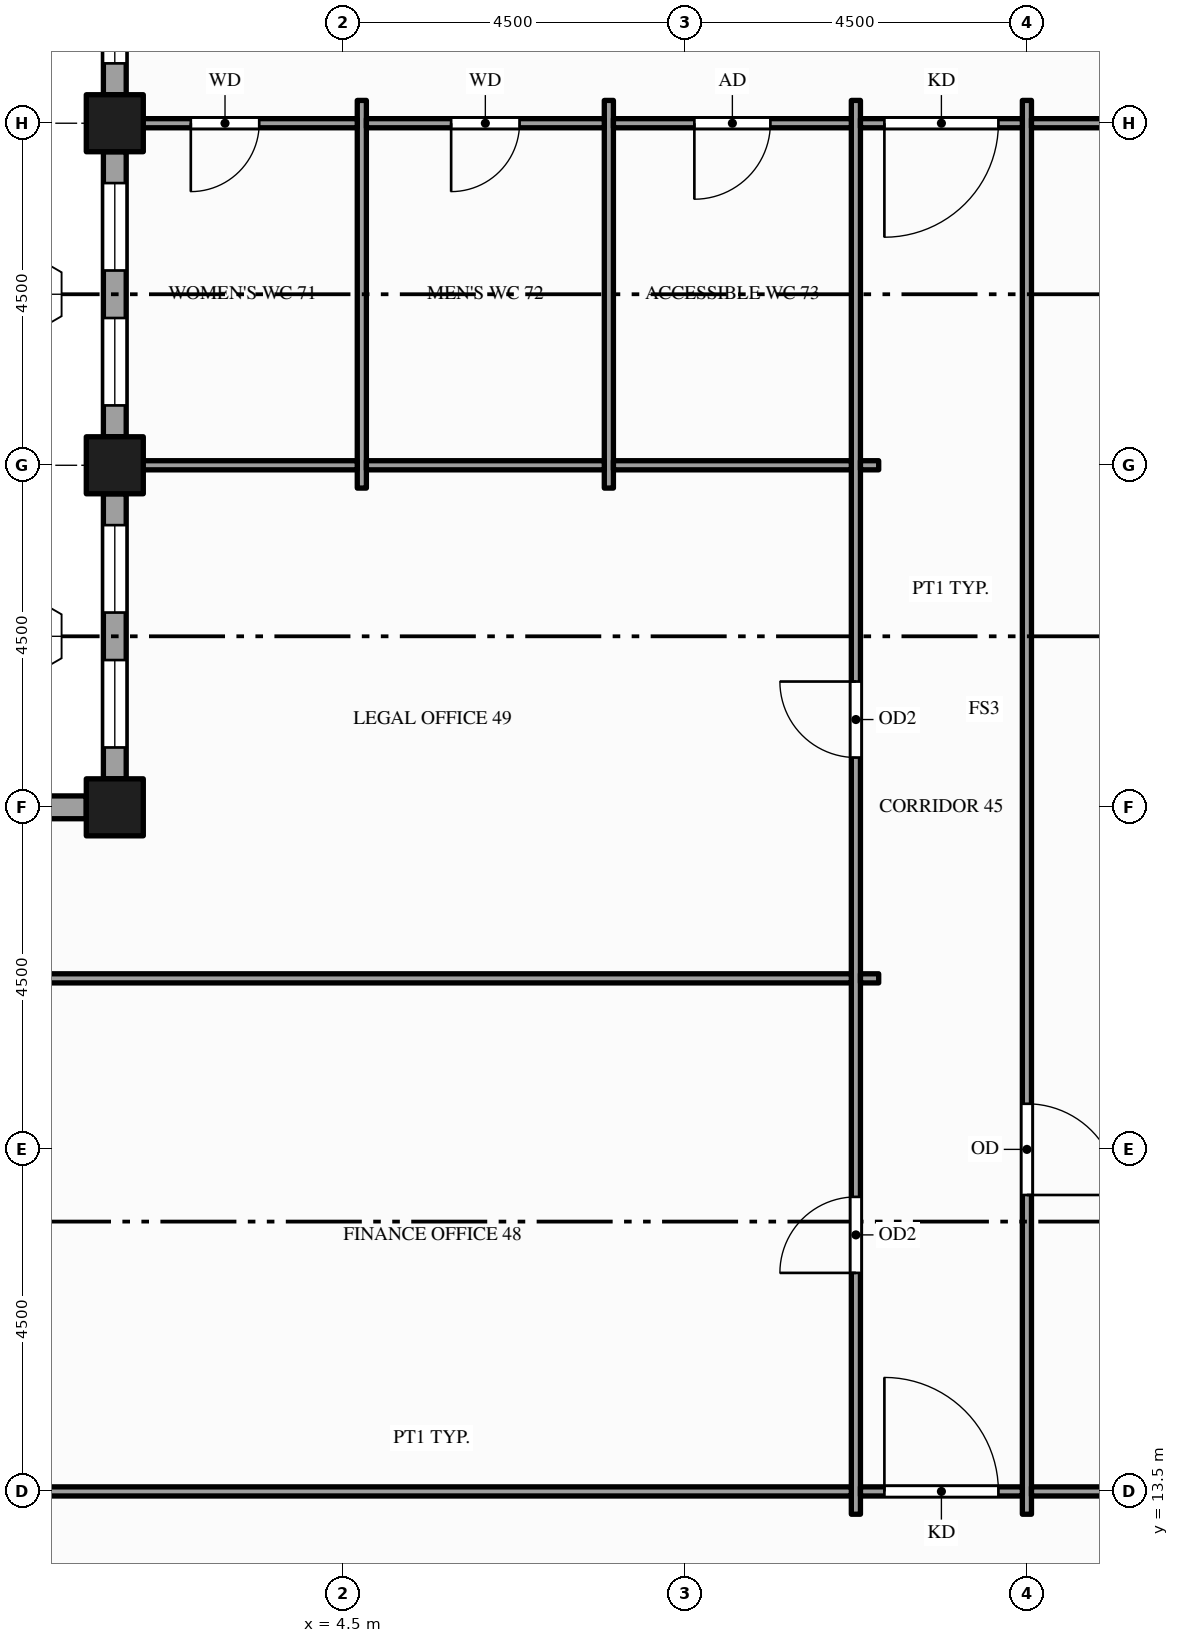
"""IFC4 building model, lengths in metres.
Left out: names, types, materials, properties, quantities, classifications, styles, units other than length and angle.
Written with IfcOpenShell. Run it as: python <this file> out.ifc"""

import sys

from ifc_helpers import new_model, si_unit, direction, frame, frame_2d, origin, origin_2d, place, context, subcontext, project, spatial, rectangle, hollow_rectangle, extrude, element, fill, save


model = new_model("IFC4")
c1 = context("Model", 3, precision=1e-05, world=origin(), true_north=direction((0.0, 1.0)))
c2 = subcontext(c1, "Body", "Model", "MODEL_VIEW")
j1 = project(units=[si_unit("LENGTHUNIT", "METRE"), si_unit("PLANEANGLEUNIT", "RADIAN")], contexts=[c1])
p1 = place(None, origin())
s1 = spatial("IfcSite", under=j1, at=p1, CompositionType="ELEMENT")
p2 = place(p1, origin())
s2 = spatial("IfcBuilding", under=s1, at=p2, CompositionType="ELEMENT")
p3 = place(p2, frame((0.0, 0.0, 207.0)))
s3 = spatial("IfcBuildingStorey", under=s2, at=p3, CompositionType="ELEMENT", Elevation=207.0)
for number, where, z_axis, x_axis in (
    (1, (1.5, 22.5, -0.15), (0.0, 0.0, 1.0), (1.0, 0.0, 0.0)),
    (2, (1.5, 27.0, -0.15), (0.0, 0.0, 1.0), (1.0, 0.0, 0.0)),
    (3, (1.5, 31.5, -0.15), (0.0, 0.0, 1.0), (1.0, 0.0, 0.0)),
):
    element("IfcColumn", number, at=place(p3, frame(where, z_axis=z_axis, x_axis=x_axis)), inside=s3, PredefinedType="COLUMN", context=c2, shape_type="SweptSolid", body=[
        extrude(hollow_rectangle(XDim=0.75, YDim=0.75, WallThickness=0.036, at=origin_2d()), origin(), (0.0, 0.0, 1.0), 4.0),
    ])
p4 = place(p3, frame((1.5, 36.0, 0.0), z_axis=(0.0, 0.0, 1.0), x_axis=(0.0, -1.0, 0.0)))
e4 = element("IfcWall", 4, at=p4, inside=s3, PredefinedType="STANDARD", context=c2, shape_type="SweptSolid", body=[
    extrude(rectangle(XDim=4.125, YDim=0.3, at=frame_2d((2.062, 0.0))), origin(), (0.0, 0.0, 1.0), 3.157),
])
p5 = place(p4, frame((0.4, 0.0, 0.9)))
e5 = element("IfcOpeningElement", 5, at=p5, cuts=e4, PredefinedType="OPENING", context=c2, shape_type="SweptSolid", body=[
    extrude(rectangle(XDim=1.55, YDim=2.0, at=frame_2d((0.775, 1.0))), frame((0.0, 0.16, 0.0), z_axis=(0.0, -1.0, 0.0), x_axis=(1.0, 0.0, 0.0)), (0.0, 0.0, 1.0), 0.32),
])
p6 = place(p4, frame((2.562, 0.0, 0.9)))
e6 = element("IfcOpeningElement", 6, at=p6, cuts=e4, PredefinedType="OPENING", context=c2, shape_type="SweptSolid", body=[
    extrude(rectangle(XDim=1.15, YDim=2.0, at=frame_2d((0.575, 1.0))), frame((0.0, 0.16, 0.0), z_axis=(0.0, -1.0, 0.0), x_axis=(1.0, 0.0, 0.0)), (0.0, 0.0, 1.0), 0.32),
])
p7 = place(p3, frame((1.5, 31.125, 0.0), z_axis=(0.0, 0.0, 1.0), x_axis=(0.0, -1.0, 0.0)))
e7 = element("IfcWall", 7, at=p7, inside=s3, PredefinedType="STANDARD", context=c2, shape_type="SweptSolid", body=[
    extrude(rectangle(XDim=3.75, YDim=0.3, at=frame_2d((1.875, 0.0))), origin(), (0.0, 0.0, 1.0), 3.157),
])
p8 = place(p7, frame((0.413, 0.0, 0.9)))
e8 = element("IfcOpeningElement", 8, at=p8, cuts=e7, PredefinedType="OPENING", context=c2, shape_type="SweptSolid", body=[
    extrude(rectangle(XDim=1.15, YDim=2.0, at=frame_2d((0.575, 1.0))), frame((0.0, 0.16, 0.0), z_axis=(0.0, -1.0, 0.0), x_axis=(1.0, 0.0, 0.0)), (0.0, 0.0, 1.0), 0.32),
])
p9 = place(p7, frame((2.188, 0.0, 0.9)))
e9 = element("IfcOpeningElement", 9, at=p9, cuts=e7, PredefinedType="OPENING", context=c2, shape_type="SweptSolid", body=[
    extrude(rectangle(XDim=1.15, YDim=2.0, at=frame_2d((0.575, 1.0))), frame((0.0, 0.16, 0.0), z_axis=(0.0, -1.0, 0.0), x_axis=(1.0, 0.0, 0.0)), (0.0, 0.0, 1.0), 0.32),
])
p10 = place(p3, frame((1.5, 26.625, 0.0), z_axis=(0.0, 0.0, 1.0), x_axis=(0.0, -1.0, 0.0)))
e10 = element("IfcWall", 10, at=p10, inside=s3, PredefinedType="STANDARD", context=c2, shape_type="SweptSolid", body=[
    extrude(rectangle(XDim=3.75, YDim=0.3, at=frame_2d((1.875, 0.0))), origin(), (0.0, 0.0, 1.0), 3.157),
])
p11 = place(p10, frame((0.413, 0.0, 0.9)))
e11 = element("IfcOpeningElement", 11, at=p11, cuts=e10, PredefinedType="OPENING", context=c2, shape_type="SweptSolid", body=[
    extrude(rectangle(XDim=1.15, YDim=2.0, at=frame_2d((0.575, 1.0))), frame((0.0, 0.16, 0.0), z_axis=(0.0, -1.0, 0.0), x_axis=(1.0, 0.0, 0.0)), (0.0, 0.0, 1.0), 0.32),
])
p12 = place(p10, frame((2.188, 0.0, 0.9)))
e12 = element("IfcOpeningElement", 12, at=p12, cuts=e10, PredefinedType="OPENING", context=c2, shape_type="SweptSolid", body=[
    extrude(rectangle(XDim=1.15, YDim=2.0, at=frame_2d((0.575, 1.0))), frame((0.0, 0.16, 0.0), z_axis=(0.0, -1.0, 0.0), x_axis=(1.0, 0.0, 0.0)), (0.0, 0.0, 1.0), 0.32),
])
p13 = place(p3, frame((1.125, 22.5, 0.0), z_axis=(0.0, 0.0, 1.0), x_axis=(-1.0, 0.0, 0.0)))
e13 = element("IfcWall", 13, at=p13, inside=s3, PredefinedType="STANDARD", context=c2, shape_type="SweptSolid", body=[
    extrude(rectangle(XDim=0.75, YDim=0.3, at=frame_2d((0.375, 0.0))), origin(), (0.0, 0.0, 1.0), 3.157),
])
for number, where, z_axis, x_axis in (
    (14, (4.75, 26.7, 0.0), (0.0, 0.0, 1.0), (0.0, 1.0, 0.0)),
    (15, (8.0, 26.7, 0.0), (0.0, 0.0, 1.0), (0.0, 1.0, 0.0)),
):
    element("IfcWall", number, at=place(p3, frame(where, z_axis=z_axis, x_axis=x_axis)), inside=s3, PredefinedType="PARTITIONING", context=c2, shape_type="SweptSolid", body=[
        extrude(rectangle(XDim=5.1, YDim=0.12, at=frame_2d((2.55, 0.0))), origin(), (0.0, 0.0, 1.0), 3.85),
    ])
p14 = place(p3, frame((11.25, 13.2, 0.0), z_axis=(0.0, 0.0, 1.0), x_axis=(0.0, 1.0, 0.0)))
e16 = element("IfcWall", 16, at=p14, inside=s3, PredefinedType="PARTITIONING", context=c2, shape_type="SweptSolid", body=[
    extrude(rectangle(XDim=18.6, YDim=0.12, at=frame_2d((9.3, 0.0))), origin(), (0.0, 0.0, 1.0), 2.6),
])
p15 = place(p14, frame((3.175, 0.0, 0.0)))
e17 = element("IfcOpeningElement", 17, at=p15, cuts=e16, PredefinedType="OPENING", context=c2, shape_type="SweptSolid", body=[
    extrude(rectangle(XDim=1.0, YDim=2.1, at=frame_2d((0.5, 1.05))), frame((0.0, 0.07, 0.0), z_axis=(0.0, -1.0, 0.0), x_axis=(1.0, 0.0, 0.0)), (0.0, 0.0, 1.0), 0.14),
])
p16 = place(p14, frame((9.955, 0.0, 0.0)))
e18 = element("IfcOpeningElement", 18, at=p16, cuts=e16, PredefinedType="OPENING", context=c2, shape_type="SweptSolid", body=[
    extrude(rectangle(XDim=1.0, YDim=2.1, at=frame_2d((0.5, 1.05))), frame((0.0, 0.07, 0.0), z_axis=(0.0, -1.0, 0.0), x_axis=(1.0, 0.0, 0.0)), (0.0, 0.0, 1.0), 0.14),
])
p17 = place(p3, frame((13.5, 13.2, 0.0), z_axis=(0.0, 0.0, 1.0), x_axis=(0.0, 1.0, 0.0)))
e19 = element("IfcWall", 19, at=p17, inside=s3, PredefinedType="PARTITIONING", context=c2, shape_type="SweptSolid", body=[
    extrude(rectangle(XDim=18.6, YDim=0.12, at=frame_2d((9.3, 0.0))), origin(), (0.0, 0.0, 1.0), 2.6),
])
p18 = place(p17, frame((4.2, 0.0, 0.0)))
e20 = element("IfcOpeningElement", 20, at=p18, cuts=e19, PredefinedType="OPENING", context=c2, shape_type="SweptSolid", body=[
    extrude(rectangle(XDim=1.2, YDim=2.1, at=frame_2d((0.6, 1.05))), frame((0.0, 0.07, 0.0), z_axis=(0.0, -1.0, 0.0), x_axis=(1.0, 0.0, 0.0)), (0.0, 0.0, 1.0), 0.14),
])
p19 = place(p3, frame((0.15, 13.5, 0.0), z_axis=(0.0, 0.0, 1.0), x_axis=(1.0, 0.0, 0.0)))
e21 = element("IfcWall", 21, at=p19, inside=s3, PredefinedType="PARTITIONING", context=c2, shape_type="SweptSolid", body=[
    extrude(rectangle(XDim=11.04, YDim=0.12, at=frame_2d((5.52, 0.0))), origin(), (0.0, 0.0, 1.0), 2.87),
])
p20 = place(p3, frame((11.31, 13.5, 0.0), z_axis=(0.0, 0.0, 1.0), x_axis=(1.0, 0.0, 0.0)))
e22 = element("IfcWall", 22, at=p20, inside=s3, PredefinedType="PARTITIONING", context=c2, shape_type="SweptSolid", body=[
    extrude(rectangle(XDim=2.13, YDim=0.12, at=frame_2d((1.065, 0.0))), origin(), (0.0, 0.0, 1.0), 2.87),
])
p21 = place(p20, frame((0.315, 0.0, 0.0)))
e23 = element("IfcOpeningElement", 23, at=p21, cuts=e22, PredefinedType="OPENING", context=c2, shape_type="SweptSolid", body=[
    extrude(rectangle(XDim=1.5, YDim=2.1, at=frame_2d((0.75, 1.05))), frame((0.0, 0.07, 0.0), z_axis=(0.0, -1.0, 0.0), x_axis=(1.0, 0.0, 0.0)), (0.0, 0.0, 1.0), 0.14),
])
p22 = place(p3, frame((13.56, 13.5, 0.0), z_axis=(0.0, 0.0, 1.0), x_axis=(1.0, 0.0, 0.0)))
e24 = element("IfcWall", 24, at=p22, inside=s3, PredefinedType="PARTITIONING", context=c2, shape_type="SweptSolid", body=[
    extrude(rectangle(XDim=13.38, YDim=0.12, at=frame_2d((6.69, 0.0))), origin(), (0.0, 0.0, 1.0), 2.76),
])
p23 = place(p22, frame((3.54, 0.0, 0.0)))
e25 = element("IfcOpeningElement", 25, at=p23, cuts=e24, PredefinedType="OPENING", context=c2, shape_type="SweptSolid", body=[
    extrude(rectangle(XDim=1.8, YDim=2.1, at=frame_2d((0.9, 1.05))), frame((0.0, 0.07, 0.0), z_axis=(0.0, -1.0, 0.0), x_axis=(1.0, 0.0, 0.0)), (0.0, 0.0, 1.0), 0.14),
])
p24 = place(p3, frame((0.15, 20.25, 0.0), z_axis=(0.0, 0.0, 1.0), x_axis=(1.0, 0.0, 0.0)))
e26 = element("IfcWall", 26, at=p24, inside=s3, PredefinedType="PARTITIONING", context=c2, shape_type="SweptSolid", body=[
    extrude(rectangle(XDim=11.04, YDim=0.12, at=frame_2d((5.52, 0.0))), origin(), (0.0, 0.0, 1.0), 2.87),
])
p25 = place(p3, frame((11.31, 20.25, 0.0), z_axis=(0.0, 0.0, 1.0), x_axis=(1.0, 0.0, 0.0)))
e27 = element("IfcWall", 27, at=p25, inside=s3, PredefinedType="PARTITIONING", context=c2, shape_type="SweptSolid", body=[
    extrude(rectangle(XDim=0.24, YDim=0.12, at=frame_2d((0.12, 0.0))), origin(), (0.0, 0.0, 1.0), 2.87),
])
p26 = place(p3, frame((1.65, 27.0, 0.0), z_axis=(0.0, 0.0, 1.0), x_axis=(1.0, 0.0, 0.0)))
e28 = element("IfcWall", 28, at=p26, inside=s3, PredefinedType="PARTITIONING", context=c2, shape_type="SweptSolid", body=[
    extrude(rectangle(XDim=3.04, YDim=0.12, at=frame_2d((1.52, 0.0))), origin(), (0.0, 0.0, 1.0), 2.87),
])
for number, where, z_axis, x_axis in (
    (29, (4.81, 27.0, 0.0), (0.0, 0.0, 1.0), (1.0, 0.0, 0.0)),
    (30, (8.06, 27.0, 0.0), (0.0, 0.0, 1.0), (1.0, 0.0, 0.0)),
):
    element("IfcWall", number, at=place(p3, frame(where, z_axis=z_axis, x_axis=x_axis)), inside=s3, PredefinedType="PARTITIONING", context=c2, shape_type="SweptSolid", body=[
        extrude(rectangle(XDim=3.13, YDim=0.12, at=frame_2d((1.565, 0.0))), origin(), (0.0, 0.0, 1.0), 2.87),
    ])
p27 = place(p3, frame((11.31, 27.0, 0.0), z_axis=(0.0, 0.0, 1.0), x_axis=(1.0, 0.0, 0.0)))
e31 = element("IfcWall", 31, at=p27, inside=s3, PredefinedType="PARTITIONING", context=c2, shape_type="SweptSolid", body=[
    extrude(rectangle(XDim=0.24, YDim=0.12, at=frame_2d((0.12, 0.0))), origin(), (0.0, 0.0, 1.0), 2.87),
])
p28 = place(p3, frame((1.65, 31.5, 0.0), z_axis=(0.0, 0.0, 1.0), x_axis=(1.0, 0.0, 0.0)))
e32 = element("IfcWall", 32, at=p28, inside=s3, PredefinedType="PARTITIONING", context=c2, shape_type="SweptSolid", body=[
    extrude(rectangle(XDim=3.04, YDim=0.12, at=frame_2d((1.52, 0.0))), origin(), (0.0, 0.0, 1.0), 2.87),
])
p29 = place(p28, frame((0.85, 0.0, 0.0)))
e33 = element("IfcOpeningElement", 33, at=p29, cuts=e32, PredefinedType="OPENING", context=c2, shape_type="SweptSolid", body=[
    extrude(rectangle(XDim=0.9, YDim=2.1, at=frame_2d((0.45, 1.05))), frame((0.0, 0.07, 0.0), z_axis=(0.0, -1.0, 0.0), x_axis=(1.0, 0.0, 0.0)), (0.0, 0.0, 1.0), 0.14),
])
p30 = place(p3, frame((4.81, 31.5, 0.0), z_axis=(0.0, 0.0, 1.0), x_axis=(1.0, 0.0, 0.0)))
e34 = element("IfcWall", 34, at=p30, inside=s3, PredefinedType="PARTITIONING", context=c2, shape_type="SweptSolid", body=[
    extrude(rectangle(XDim=3.13, YDim=0.12, at=frame_2d((1.565, 0.0))), origin(), (0.0, 0.0, 1.0), 2.87),
])
p31 = place(p30, frame((1.115, 0.0, 0.0)))
e35 = element("IfcOpeningElement", 35, at=p31, cuts=e34, PredefinedType="OPENING", context=c2, shape_type="SweptSolid", body=[
    extrude(rectangle(XDim=0.9, YDim=2.1, at=frame_2d((0.45, 1.05))), frame((0.0, 0.07, 0.0), z_axis=(0.0, -1.0, 0.0), x_axis=(1.0, 0.0, 0.0)), (0.0, 0.0, 1.0), 0.14),
])
p32 = place(p3, frame((8.06, 31.5, 0.0), z_axis=(0.0, 0.0, 1.0), x_axis=(1.0, 0.0, 0.0)))
e36 = element("IfcWall", 36, at=p32, inside=s3, PredefinedType="PARTITIONING", context=c2, shape_type="SweptSolid", body=[
    extrude(rectangle(XDim=3.13, YDim=0.12, at=frame_2d((1.565, 0.0))), origin(), (0.0, 0.0, 1.0), 2.87),
])
p33 = place(p32, frame((1.065, 0.0, 0.0)))
e37 = element("IfcOpeningElement", 37, at=p33, cuts=e36, PredefinedType="OPENING", context=c2, shape_type="SweptSolid", body=[
    extrude(rectangle(XDim=1.0, YDim=2.1, at=frame_2d((0.5, 1.05))), frame((0.0, 0.07, 0.0), z_axis=(0.0, -1.0, 0.0), x_axis=(1.0, 0.0, 0.0)), (0.0, 0.0, 1.0), 0.14),
])
p34 = place(p3, frame((11.31, 31.5, 0.0), z_axis=(0.0, 0.0, 1.0), x_axis=(1.0, 0.0, 0.0)))
e38 = element("IfcWall", 38, at=p34, inside=s3, PredefinedType="PARTITIONING", context=c2, shape_type="SweptSolid", body=[
    extrude(rectangle(XDim=2.13, YDim=0.12, at=frame_2d((1.065, 0.0))), origin(), (0.0, 0.0, 1.0), 2.87),
])
p35 = place(p34, frame((0.315, 0.0, 0.0)))
e39 = element("IfcOpeningElement", 39, at=p35, cuts=e38, PredefinedType="OPENING", context=c2, shape_type="SweptSolid", body=[
    extrude(rectangle(XDim=1.5, YDim=2.1, at=frame_2d((0.75, 1.05))), frame((0.0, 0.07, 0.0), z_axis=(0.0, -1.0, 0.0), x_axis=(1.0, 0.0, 0.0)), (0.0, 0.0, 1.0), 0.14),
])
p36 = place(p3, frame((13.56, 31.5, 0.0), z_axis=(0.0, 0.0, 1.0), x_axis=(1.0, 0.0, 0.0)))
e40 = element("IfcWall", 40, at=p36, inside=s3, PredefinedType="PARTITIONING", context=c2, shape_type="SweptSolid", body=[
    extrude(rectangle(XDim=10.29, YDim=0.12, at=frame_2d((5.145, 0.0))), origin(), (0.0, 0.0, 1.0), 2.87),
])
p37 = place(p6, origin())
e41 = element("IfcWindow", 41, at=p37, inside=s3, PartitioningType="SINGLE_PANEL", PredefinedType="WINDOW", context=c2, shape_type="SweptSolid", body=[
    extrude(rectangle(XDim=1.15, YDim=2.0, at=frame_2d((0.575, 1.0))), frame((0.0, 0.03, 0.0), z_axis=(0.0, -1.0, 0.0), x_axis=(1.0, 0.0, 0.0)), (0.0, 0.0, 1.0), 0.06),
])
fill(e6, e41)
p38 = place(p8, origin())
e42 = element("IfcWindow", 42, at=p38, inside=s3, PartitioningType="SINGLE_PANEL", PredefinedType="WINDOW", context=c2, shape_type="SweptSolid", body=[
    extrude(rectangle(XDim=1.15, YDim=2.0, at=frame_2d((0.575, 1.0))), frame((0.0, 0.03, 0.0), z_axis=(0.0, -1.0, 0.0), x_axis=(1.0, 0.0, 0.0)), (0.0, 0.0, 1.0), 0.06),
])
fill(e8, e42)
p39 = place(p9, origin())
e43 = element("IfcWindow", 43, at=p39, inside=s3, PartitioningType="SINGLE_PANEL", PredefinedType="WINDOW", context=c2, shape_type="SweptSolid", body=[
    extrude(rectangle(XDim=1.15, YDim=2.0, at=frame_2d((0.575, 1.0))), frame((0.0, 0.03, 0.0), z_axis=(0.0, -1.0, 0.0), x_axis=(1.0, 0.0, 0.0)), (0.0, 0.0, 1.0), 0.06),
])
fill(e9, e43)
p40 = place(p11, origin())
e44 = element("IfcWindow", 44, at=p40, inside=s3, PartitioningType="SINGLE_PANEL", PredefinedType="WINDOW", context=c2, shape_type="SweptSolid", body=[
    extrude(rectangle(XDim=1.15, YDim=2.0, at=frame_2d((0.575, 1.0))), frame((0.0, 0.03, 0.0), z_axis=(0.0, -1.0, 0.0), x_axis=(1.0, 0.0, 0.0)), (0.0, 0.0, 1.0), 0.06),
])
fill(e11, e44)
p41 = place(p12, origin())
e45 = element("IfcWindow", 45, at=p41, inside=s3, PartitioningType="SINGLE_PANEL", PredefinedType="WINDOW", context=c2, shape_type="SweptSolid", body=[
    extrude(rectangle(XDim=1.15, YDim=2.0, at=frame_2d((0.575, 1.0))), frame((0.0, 0.03, 0.0), z_axis=(0.0, -1.0, 0.0), x_axis=(1.0, 0.0, 0.0)), (0.0, 0.0, 1.0), 0.06),
])
fill(e12, e45)
p42 = place(p21, origin())
e46 = element("IfcDoor", 46, at=p42, inside=s3, OperationType="SINGLE_SWING_LEFT", PredefinedType="DOOR", context=c2, shape_type="SweptSolid", body=[
    extrude(rectangle(XDim=1.5, YDim=2.1, at=frame_2d((0.75, 1.05))), frame((0.0, 0.025, 0.0), z_axis=(0.0, -1.0, 0.0), x_axis=(1.0, 0.0, 0.0)), (0.0, 0.0, 1.0), 0.05),
])
fill(e23, e46)
p43 = place(p35, origin())
e47 = element("IfcDoor", 47, at=p43, inside=s3, OperationType="SINGLE_SWING_LEFT", PredefinedType="DOOR", context=c2, shape_type="SweptSolid", body=[
    extrude(rectangle(XDim=1.5, YDim=2.1, at=frame_2d((0.75, 1.05))), frame((0.0, 0.025, 0.0), z_axis=(0.0, -1.0, 0.0), x_axis=(1.0, 0.0, 0.0)), (0.0, 0.0, 1.0), 0.05),
])
fill(e39, e47)
p44 = place(p15, origin())
e48 = element("IfcDoor", 48, at=p44, inside=s3, OperationType="SINGLE_SWING_LEFT", PredefinedType="DOOR", context=c2, shape_type="SweptSolid", body=[
    extrude(rectangle(XDim=1.0, YDim=2.1, at=frame_2d((0.5, 1.05))), frame((0.0, 0.025, 0.0), z_axis=(0.0, -1.0, 0.0), x_axis=(1.0, 0.0, 0.0)), (0.0, 0.0, 1.0), 0.05),
])
fill(e17, e48)
p45 = place(p16, origin())
e49 = element("IfcDoor", 49, at=p45, inside=s3, OperationType="SINGLE_SWING_RIGHT", PredefinedType="DOOR", context=c2, shape_type="SweptSolid", body=[
    extrude(rectangle(XDim=1.0, YDim=2.1, at=frame_2d((0.5, 1.05))), frame((0.0, 0.025, 0.0), z_axis=(0.0, -1.0, 0.0), x_axis=(1.0, 0.0, 0.0)), (0.0, 0.0, 1.0), 0.05),
])
fill(e18, e49)
p46 = place(p29, origin())
e50 = element("IfcDoor", 50, at=p46, inside=s3, OperationType="SINGLE_SWING_LEFT", PredefinedType="DOOR", context=c2, shape_type="SweptSolid", body=[
    extrude(rectangle(XDim=0.9, YDim=2.1, at=frame_2d((0.45, 1.05))), frame((0.0, 0.025, 0.0), z_axis=(0.0, -1.0, 0.0), x_axis=(1.0, 0.0, 0.0)), (0.0, 0.0, 1.0), 0.05),
])
fill(e33, e50)
p47 = place(p31, origin())
e51 = element("IfcDoor", 51, at=p47, inside=s3, OperationType="SINGLE_SWING_LEFT", PredefinedType="DOOR", context=c2, shape_type="SweptSolid", body=[
    extrude(rectangle(XDim=0.9, YDim=2.1, at=frame_2d((0.45, 1.05))), frame((0.0, 0.025, 0.0), z_axis=(0.0, -1.0, 0.0), x_axis=(1.0, 0.0, 0.0)), (0.0, 0.0, 1.0), 0.05),
])
fill(e35, e51)
p48 = place(p33, origin())
e52 = element("IfcDoor", 52, at=p48, inside=s3, OperationType="SINGLE_SWING_LEFT", PredefinedType="DOOR", context=c2, shape_type="SweptSolid", body=[
    extrude(rectangle(XDim=1.0, YDim=2.1, at=frame_2d((0.5, 1.05))), frame((0.0, 0.025, 0.0), z_axis=(0.0, -1.0, 0.0), x_axis=(1.0, 0.0, 0.0)), (0.0, 0.0, 1.0), 0.05),
])
fill(e37, e52)
p49 = place(p18, origin())
e53 = element("IfcDoor", 53, at=p49, inside=s3, OperationType="SINGLE_SWING_LEFT", PredefinedType="DOOR", context=c2, shape_type="SweptSolid", body=[
    extrude(rectangle(XDim=1.2, YDim=2.1, at=frame_2d((0.6, 1.05))), frame((0.0, 0.025, 0.0), z_axis=(0.0, -1.0, 0.0), x_axis=(1.0, 0.0, 0.0)), (0.0, 0.0, 1.0), 0.05),
])
fill(e20, e53)
save(model, sys.argv[1])
